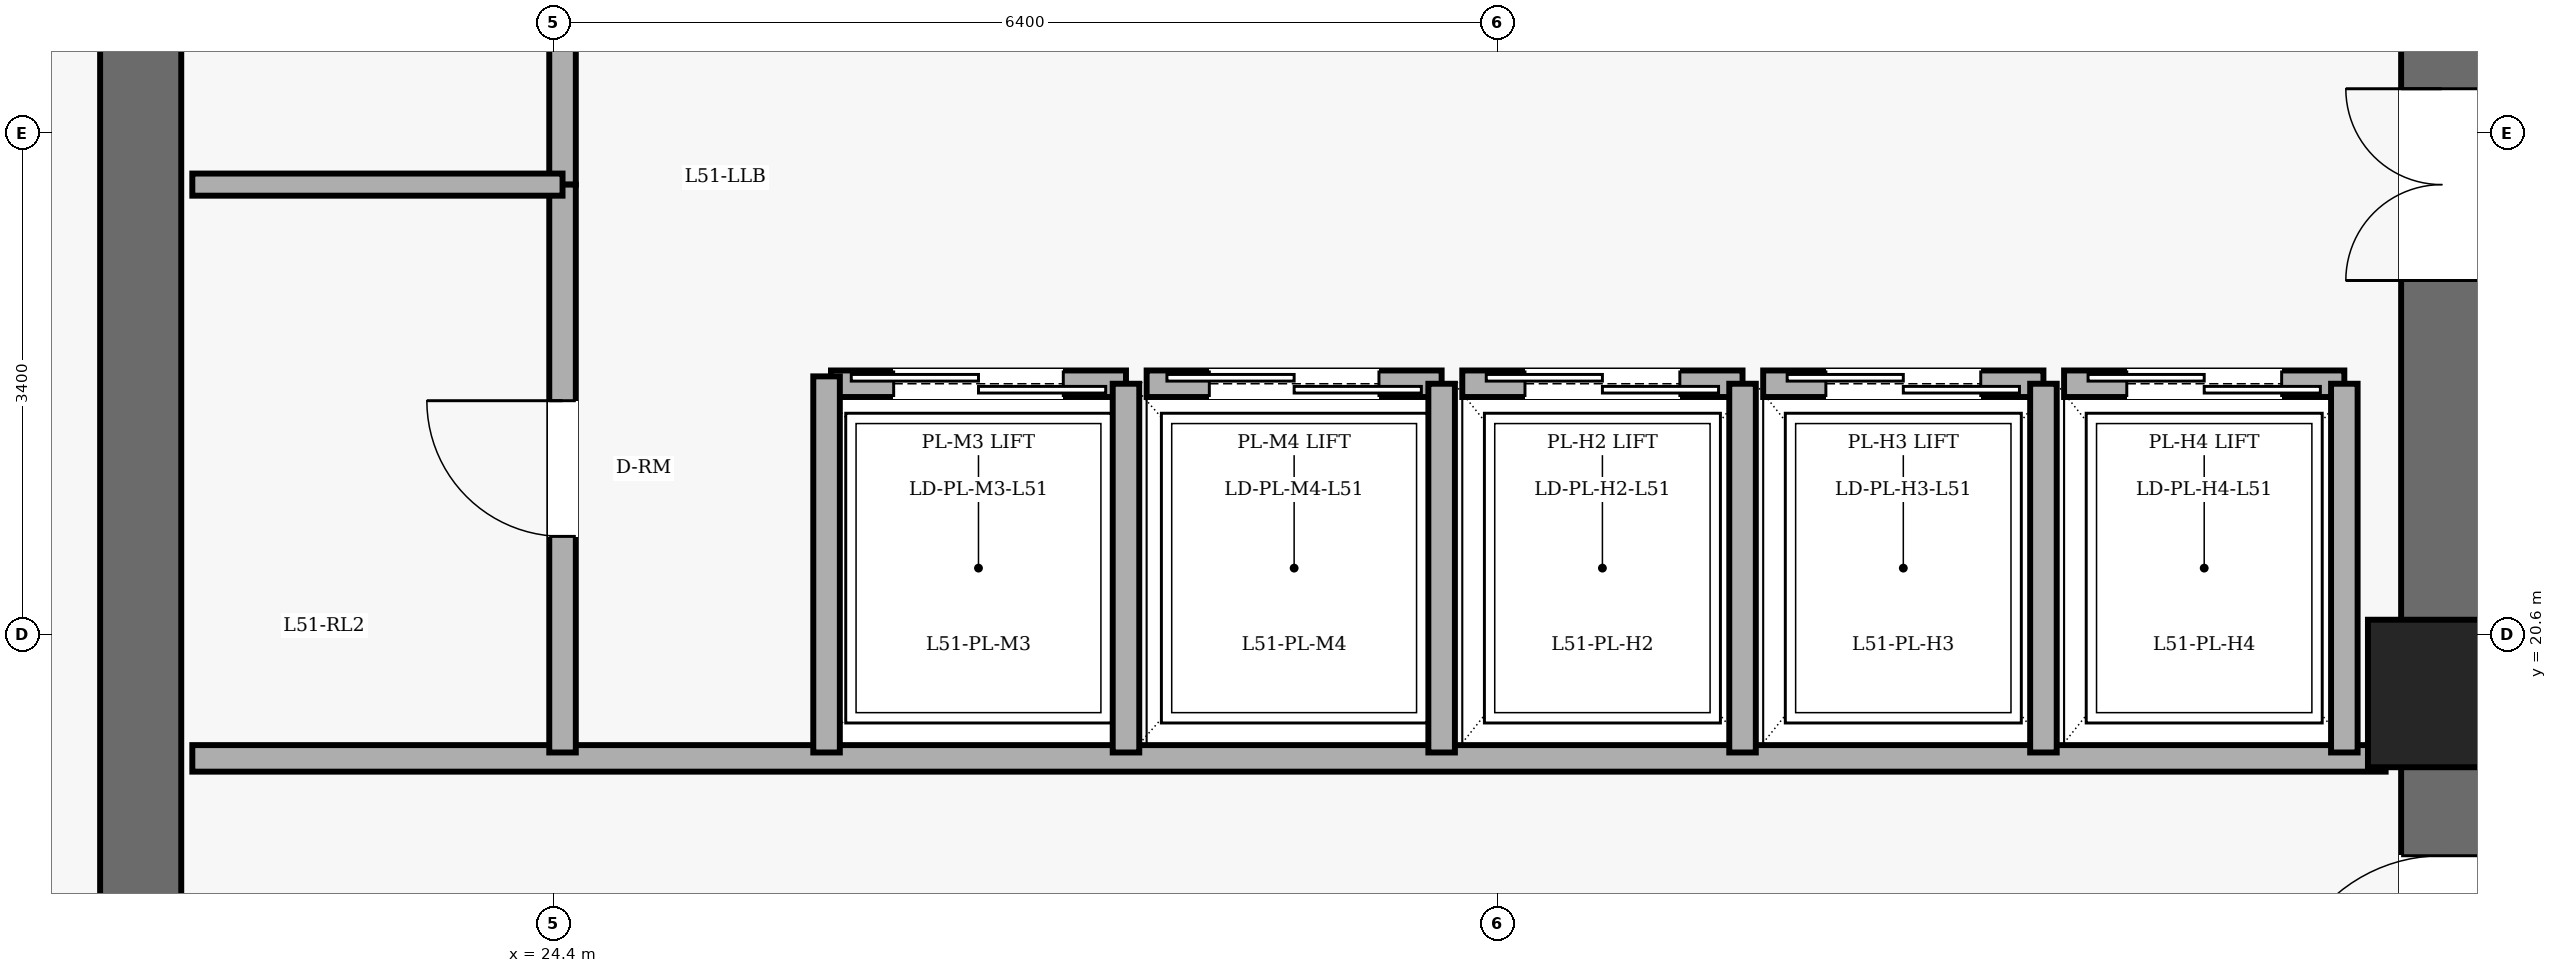
"""IFC4 building model, lengths in metres.
Left out: names, types, materials, properties, quantities, classifications, styles, units other than length and angle.
Written with IfcOpenShell. Run it as: python <this file> out.ifc"""

import sys

from ifc_helpers import new_model, si_unit, direction, frame, frame_2d, origin, origin_2d, place, context, subcontext, project, spatial, rectangle, extrude, element, fill, save


model = new_model("IFC4")
c1 = context("Model", 3, precision=1e-05, world=origin(), true_north=direction((0.0, 1.0)))
c2 = subcontext(c1, "Body", "Model", "MODEL_VIEW")
j1 = project(units=[si_unit("LENGTHUNIT", "METRE"), si_unit("PLANEANGLEUNIT", "RADIAN")], contexts=[c1])
p1 = place(None, origin())
s1 = spatial("IfcSite", under=j1, at=p1, CompositionType="ELEMENT")
p2 = place(p1, origin())
s2 = spatial("IfcBuilding", under=s1, at=p2, CompositionType="ELEMENT")
p3 = place(p2, frame((0.0, 0.0, 196.2)))
s3 = spatial("IfcBuildingStorey", under=s2, at=p3, CompositionType="ELEMENT", Elevation=196.2)
p4 = place(p3, frame((37.2, 20.2, 0.0), z_axis=(0.0, 0.0, 1.0), x_axis=(1.0, 0.0, 0.0)))
e1 = element("IfcColumn", 1, at=p4, inside=s3, PredefinedType="COLUMN", context=c2, shape_type="SweptSolid", body=[
    extrude(rectangle(XDim=1.0, YDim=1.0, at=origin_2d()), origin(), (0.0, 0.0, 1.0), 5.1),
])
p5 = place(p3, frame((21.6, 14.4, 0.0), z_axis=(0.0, 0.0, 1.0), x_axis=(0.0, 1.0, 0.0)))
e2 = element("IfcWall", 2, at=p5, inside=s3, PredefinedType="SHEAR", context=c2, shape_type="SweptSolid", body=[
    extrude(rectangle(XDim=19.2, YDim=0.55, at=frame_2d((9.6, 0.0))), origin(), (0.0, 0.0, 1.0), 4.9),
])
p6 = place(p3, frame((37.2, 14.4, 0.0), z_axis=(0.0, 0.0, 1.0), x_axis=(0.0, 1.0, 0.0)))
e3 = element("IfcWall", 3, at=p6, inside=s3, PredefinedType="SHEAR", context=c2, shape_type="SweptSolid", body=[
    extrude(rectangle(XDim=19.2, YDim=0.55, at=frame_2d((9.6, 0.0))), origin(), (0.0, 0.0, 1.0), 4.9),
])
p7 = place(p6, frame((15.8, 0.0, 0.0)))
e4 = element("IfcOpeningElement", 4, at=p7, cuts=e3, PredefinedType="OPENING", context=c2, shape_type="SweptSolid", body=[
    extrude(rectangle(XDim=1.15, YDim=2.15, at=frame_2d((0.575, 1.075))), frame((0.0, 0.285, 0.0), z_axis=(0.0, -1.0, 0.0), x_axis=(1.0, 0.0, 0.0)), (0.0, 0.0, 1.0), 0.57),
])
p8 = place(p6, frame((3.6, 0.0, 0.0)))
e5 = element("IfcOpeningElement", 5, at=p8, cuts=e3, PredefinedType="OPENING", context=c2, shape_type="SweptSolid", body=[
    extrude(rectangle(XDim=1.1, YDim=2.15, at=frame_2d((0.55, 1.075))), frame((0.0, 0.285, 0.0), z_axis=(0.0, -1.0, 0.0), x_axis=(1.0, 0.0, 0.0)), (0.0, 0.0, 1.0), 0.57),
])
p9 = place(p6, frame((8.6, 0.0, 0.0)))
e6 = element("IfcOpeningElement", 6, at=p9, cuts=e3, PredefinedType="OPENING", context=c2, shape_type="SweptSolid", body=[
    extrude(rectangle(XDim=1.3, YDim=2.2, at=frame_2d((0.65, 1.1))), frame((0.0, 0.285, 0.0), z_axis=(0.0, -1.0, 0.0), x_axis=(1.0, 0.0, 0.0)), (0.0, 0.0, 1.0), 0.57),
])
p10 = place(p3, frame((21.95, 19.76, 0.0), z_axis=(0.0, 0.0, 1.0), x_axis=(1.0, 0.0, 0.0)))
e7 = element("IfcWall", 7, at=p10, inside=s3, PredefinedType="PARTITIONING", context=c2, shape_type="SweptSolid", body=[
    extrude(rectangle(XDim=14.87, YDim=0.18, at=frame_2d((7.435, 0.0))), origin(), (0.0, 0.0, 1.0), 4.9),
])
p11 = place(p3, frame((26.28, 22.3, 0.0), z_axis=(0.0, 0.0, 1.0), x_axis=(1.0, 0.0, 0.0)))
e8 = element("IfcWall", 8, at=p11, inside=s3, PredefinedType="PARTITIONING", context=c2, shape_type="SweptSolid", body=[
    extrude(rectangle(XDim=2.0, YDim=0.18, at=frame_2d((1.0, 0.0))), origin(), (0.0, 0.0, 1.0), 4.9),
])
p12 = place(p11, frame((0.425, 0.0, 0.0)))
e9 = element("IfcOpeningElement", 9, at=p12, cuts=e8, PredefinedType="OPENING", context=c2, shape_type="SweptSolid", body=[
    extrude(rectangle(XDim=1.15, YDim=2.2, at=frame_2d((0.575, 1.1))), frame((0.0, 0.1, 0.0), z_axis=(0.0, -1.0, 0.0), x_axis=(1.0, 0.0, 0.0)), (0.0, 0.0, 1.0), 0.2),
])
p13 = place(p3, frame((28.28, 19.8, 0.0), z_axis=(0.0, 0.0, 1.0), x_axis=(0.0, 1.0, 0.0)))
e10 = element("IfcWall", 10, at=p13, inside=s3, PredefinedType="PARTITIONING", context=c2, shape_type="SweptSolid", body=[
    extrude(rectangle(XDim=2.5, YDim=0.18, at=frame_2d((1.25, 0.0))), origin(), (0.0, 0.0, 1.0), 4.9),
])
p14 = place(p3, frame((28.42, 22.3, 0.0), z_axis=(0.0, 0.0, 1.0), x_axis=(1.0, 0.0, 0.0)))
e11 = element("IfcWall", 11, at=p14, inside=s3, PredefinedType="PARTITIONING", context=c2, shape_type="SweptSolid", body=[
    extrude(rectangle(XDim=2.0, YDim=0.18, at=frame_2d((1.0, 0.0))), origin(), (0.0, 0.0, 1.0), 4.9),
])
p15 = place(p14, frame((0.425, 0.0, 0.0)))
e12 = element("IfcOpeningElement", 12, at=p15, cuts=e11, PredefinedType="OPENING", context=c2, shape_type="SweptSolid", body=[
    extrude(rectangle(XDim=1.15, YDim=2.2, at=frame_2d((0.575, 1.1))), frame((0.0, 0.1, 0.0), z_axis=(0.0, -1.0, 0.0), x_axis=(1.0, 0.0, 0.0)), (0.0, 0.0, 1.0), 0.2),
])
p16 = place(p3, frame((30.42, 19.8, 0.0), z_axis=(0.0, 0.0, 1.0), x_axis=(0.0, 1.0, 0.0)))
e13 = element("IfcWall", 13, at=p16, inside=s3, PredefinedType="PARTITIONING", context=c2, shape_type="SweptSolid", body=[
    extrude(rectangle(XDim=2.5, YDim=0.18, at=frame_2d((1.25, 0.0))), origin(), (0.0, 0.0, 1.0), 4.9),
])
p17 = place(p3, frame((30.56, 22.3, 0.0), z_axis=(0.0, 0.0, 1.0), x_axis=(1.0, 0.0, 0.0)))
e14 = element("IfcWall", 14, at=p17, inside=s3, PredefinedType="PARTITIONING", context=c2, shape_type="SweptSolid", body=[
    extrude(rectangle(XDim=1.9, YDim=0.18, at=frame_2d((0.95, 0.0))), origin(), (0.0, 0.0, 1.0), 4.9),
])
p18 = place(p17, frame((0.425, 0.0, 0.0)))
e15 = element("IfcOpeningElement", 15, at=p18, cuts=e14, PredefinedType="OPENING", context=c2, shape_type="SweptSolid", body=[
    extrude(rectangle(XDim=1.05, YDim=2.2, at=frame_2d((0.525, 1.1))), frame((0.0, 0.1, 0.0), z_axis=(0.0, -1.0, 0.0), x_axis=(1.0, 0.0, 0.0)), (0.0, 0.0, 1.0), 0.2),
])
p19 = place(p3, frame((32.46, 19.8, 0.0), z_axis=(0.0, 0.0, 1.0), x_axis=(0.0, 1.0, 0.0)))
e16 = element("IfcWall", 16, at=p19, inside=s3, PredefinedType="PARTITIONING", context=c2, shape_type="SweptSolid", body=[
    extrude(rectangle(XDim=2.5, YDim=0.18, at=frame_2d((1.25, 0.0))), origin(), (0.0, 0.0, 1.0), 4.9),
])
p20 = place(p3, frame((32.6, 22.3, 0.0), z_axis=(0.0, 0.0, 1.0), x_axis=(1.0, 0.0, 0.0)))
e17 = element("IfcWall", 17, at=p20, inside=s3, PredefinedType="PARTITIONING", context=c2, shape_type="SweptSolid", body=[
    extrude(rectangle(XDim=1.9, YDim=0.18, at=frame_2d((0.95, 0.0))), origin(), (0.0, 0.0, 1.0), 4.9),
])
p21 = place(p20, frame((0.425, 0.0, 0.0)))
e18 = element("IfcOpeningElement", 18, at=p21, cuts=e17, PredefinedType="OPENING", context=c2, shape_type="SweptSolid", body=[
    extrude(rectangle(XDim=1.05, YDim=2.2, at=frame_2d((0.525, 1.1))), frame((0.0, 0.1, 0.0), z_axis=(0.0, -1.0, 0.0), x_axis=(1.0, 0.0, 0.0)), (0.0, 0.0, 1.0), 0.2),
])
p22 = place(p3, frame((34.5, 19.8, 0.0), z_axis=(0.0, 0.0, 1.0), x_axis=(0.0, 1.0, 0.0)))
e19 = element("IfcWall", 19, at=p22, inside=s3, PredefinedType="PARTITIONING", context=c2, shape_type="SweptSolid", body=[
    extrude(rectangle(XDim=2.5, YDim=0.18, at=frame_2d((1.25, 0.0))), origin(), (0.0, 0.0, 1.0), 4.9),
])
p23 = place(p3, frame((34.64, 22.3, 0.0), z_axis=(0.0, 0.0, 1.0), x_axis=(1.0, 0.0, 0.0)))
e20 = element("IfcWall", 20, at=p23, inside=s3, PredefinedType="PARTITIONING", context=c2, shape_type="SweptSolid", body=[
    extrude(rectangle(XDim=1.9, YDim=0.18, at=frame_2d((0.95, 0.0))), origin(), (0.0, 0.0, 1.0), 4.9),
])
p24 = place(p23, frame((0.425, 0.0, 0.0)))
e21 = element("IfcOpeningElement", 21, at=p24, cuts=e20, PredefinedType="OPENING", context=c2, shape_type="SweptSolid", body=[
    extrude(rectangle(XDim=1.05, YDim=2.2, at=frame_2d((0.525, 1.1))), frame((0.0, 0.1, 0.0), z_axis=(0.0, -1.0, 0.0), x_axis=(1.0, 0.0, 0.0)), (0.0, 0.0, 1.0), 0.2),
])
p25 = place(p3, frame((36.54, 19.8, 0.0), z_axis=(0.0, 0.0, 1.0), x_axis=(0.0, 1.0, 0.0)))
e22 = element("IfcWall", 22, at=p25, inside=s3, PredefinedType="PARTITIONING", context=c2, shape_type="SweptSolid", body=[
    extrude(rectangle(XDim=2.5, YDim=0.18, at=frame_2d((1.25, 0.0))), origin(), (0.0, 0.0, 1.0), 4.9),
])
p26 = place(p3, frame((24.46, 23.65, 0.0), z_axis=(0.0, 0.0, 1.0), x_axis=(0.0, 1.0, 0.0)))
e23 = element("IfcWall", 23, at=p26, inside=s3, PredefinedType="PARTITIONING", context=c2, shape_type="SweptSolid", body=[
    extrude(rectangle(XDim=3.85, YDim=0.18, at=frame_2d((1.925, 0.0))), origin(), (0.0, 0.0, 1.0), 4.9),
])
p27 = place(p26, frame((1.465, 0.0, 0.0)))
e24 = element("IfcOpeningElement", 24, at=p27, cuts=e23, PredefinedType="OPENING", context=c2, shape_type="SweptSolid", body=[
    extrude(rectangle(XDim=0.92, YDim=2.1, at=frame_2d((0.46, 1.05))), frame((0.0, 0.1, 0.0), z_axis=(0.0, -1.0, 0.0), x_axis=(1.0, 0.0, 0.0)), (0.0, 0.0, 1.0), 0.2),
])
p28 = place(p3, frame((24.46, 19.8, 0.0), z_axis=(0.0, 0.0, 1.0), x_axis=(0.0, 1.0, 0.0)))
e25 = element("IfcWall", 25, at=p28, inside=s3, PredefinedType="PARTITIONING", context=c2, shape_type="SweptSolid", body=[
    extrude(rectangle(XDim=3.85, YDim=0.18, at=frame_2d((1.925, 0.0))), origin(), (0.0, 0.0, 1.0), 4.9),
])
p29 = place(p28, frame((1.465, 0.0, 0.0)))
e26 = element("IfcOpeningElement", 26, at=p29, cuts=e25, PredefinedType="OPENING", context=c2, shape_type="SweptSolid", body=[
    extrude(rectangle(XDim=0.92, YDim=2.1, at=frame_2d((0.46, 1.05))), frame((0.0, 0.1, 0.0), z_axis=(0.0, -1.0, 0.0), x_axis=(1.0, 0.0, 0.0)), (0.0, 0.0, 1.0), 0.2),
])
p30 = place(p3, frame((21.95, 23.65, 0.0), z_axis=(0.0, 0.0, 1.0), x_axis=(1.0, 0.0, 0.0)))
e27 = element("IfcWall", 27, at=p30, inside=s3, PredefinedType="PARTITIONING", context=c2, shape_type="SweptSolid", body=[
    extrude(rectangle(XDim=2.51, YDim=0.15, at=frame_2d((1.255, 0.0))), origin(), (0.0, 0.0, 1.0), 4.9),
])
p31 = place(p3, frame((26.25, 19.8, 0.0), z_axis=(0.0, 0.0, 1.0), x_axis=(0.0, 1.0, 0.0)))
e28 = element("IfcWall", 28, at=p31, inside=s3, PredefinedType="PARTITIONING", context=c2, shape_type="SweptSolid", body=[
    extrude(rectangle(XDim=2.55, YDim=0.18, at=frame_2d((1.275, 0.0))), origin(), (0.0, 0.0, 1.0), 4.9),
])
p32 = place(p8, origin())
e29 = element("IfcDoor", 29, at=p32, inside=s3, OperationType="SINGLE_SWING_LEFT", PredefinedType="DOOR", context=c2, shape_type="SweptSolid", body=[
    extrude(rectangle(XDim=1.1, YDim=2.15, at=frame_2d((0.55, 1.075))), frame((0.0, 0.025, 0.0), z_axis=(0.0, -1.0, 0.0), x_axis=(1.0, 0.0, 0.0)), (0.0, 0.0, 1.0), 0.05),
])
fill(e5, e29)
p33 = place(p12, origin())
e30 = element("IfcDoor", 30, at=p33, inside=s3, OperationType="DOUBLE_DOOR_SLIDING", PredefinedType="DOOR", context=c2, shape_type="SweptSolid", body=[
    extrude(rectangle(XDim=1.15, YDim=2.2, at=frame_2d((0.575, 1.1))), frame((0.0, 0.025, 0.0), z_axis=(0.0, -1.0, 0.0), x_axis=(1.0, 0.0, 0.0)), (0.0, 0.0, 1.0), 0.05),
])
fill(e9, e30)
p34 = place(p15, origin())
e31 = element("IfcDoor", 31, at=p34, inside=s3, OperationType="DOUBLE_DOOR_SLIDING", PredefinedType="DOOR", context=c2, shape_type="SweptSolid", body=[
    extrude(rectangle(XDim=1.15, YDim=2.2, at=frame_2d((0.575, 1.1))), frame((0.0, 0.025, 0.0), z_axis=(0.0, -1.0, 0.0), x_axis=(1.0, 0.0, 0.0)), (0.0, 0.0, 1.0), 0.05),
])
fill(e12, e31)
p35 = place(p18, origin())
e32 = element("IfcDoor", 32, at=p35, inside=s3, OperationType="DOUBLE_DOOR_SLIDING", PredefinedType="DOOR", context=c2, shape_type="SweptSolid", body=[
    extrude(rectangle(XDim=1.05, YDim=2.2, at=frame_2d((0.525, 1.1))), frame((0.0, 0.025, 0.0), z_axis=(0.0, -1.0, 0.0), x_axis=(1.0, 0.0, 0.0)), (0.0, 0.0, 1.0), 0.05),
])
fill(e15, e32)
p36 = place(p21, origin())
e33 = element("IfcDoor", 33, at=p36, inside=s3, OperationType="DOUBLE_DOOR_SLIDING", PredefinedType="DOOR", context=c2, shape_type="SweptSolid", body=[
    extrude(rectangle(XDim=1.05, YDim=2.2, at=frame_2d((0.525, 1.1))), frame((0.0, 0.025, 0.0), z_axis=(0.0, -1.0, 0.0), x_axis=(1.0, 0.0, 0.0)), (0.0, 0.0, 1.0), 0.05),
])
fill(e18, e33)
p37 = place(p24, origin())
e34 = element("IfcDoor", 34, at=p37, inside=s3, OperationType="DOUBLE_DOOR_SLIDING", PredefinedType="DOOR", context=c2, shape_type="SweptSolid", body=[
    extrude(rectangle(XDim=1.05, YDim=2.2, at=frame_2d((0.525, 1.1))), frame((0.0, 0.025, 0.0), z_axis=(0.0, -1.0, 0.0), x_axis=(1.0, 0.0, 0.0)), (0.0, 0.0, 1.0), 0.05),
])
fill(e21, e34)
p38 = place(p29, origin())
e35 = element("IfcDoor", 35, at=p38, inside=s3, OperationType="SINGLE_SWING_RIGHT", PredefinedType="DOOR", context=c2, shape_type="SweptSolid", body=[
    extrude(rectangle(XDim=0.92, YDim=2.1, at=frame_2d((0.46, 1.05))), frame((0.0, 0.025, 0.0), z_axis=(0.0, -1.0, 0.0), x_axis=(1.0, 0.0, 0.0)), (0.0, 0.0, 1.0), 0.05),
])
fill(e26, e35)
p39 = place(p9, origin())
e36 = element("IfcDoor", 36, at=p39, inside=s3, OperationType="DOUBLE_DOOR_SINGLE_SWING", PredefinedType="DOOR", context=c2, shape_type="SweptSolid", body=[
    extrude(rectangle(XDim=1.3, YDim=2.2, at=frame_2d((0.65, 1.1))), frame((0.0, 0.025, 0.0), z_axis=(0.0, -1.0, 0.0), x_axis=(1.0, 0.0, 0.0)), (0.0, 0.0, 1.0), 0.05),
])
fill(e6, e36)
save(model, sys.argv[1])
